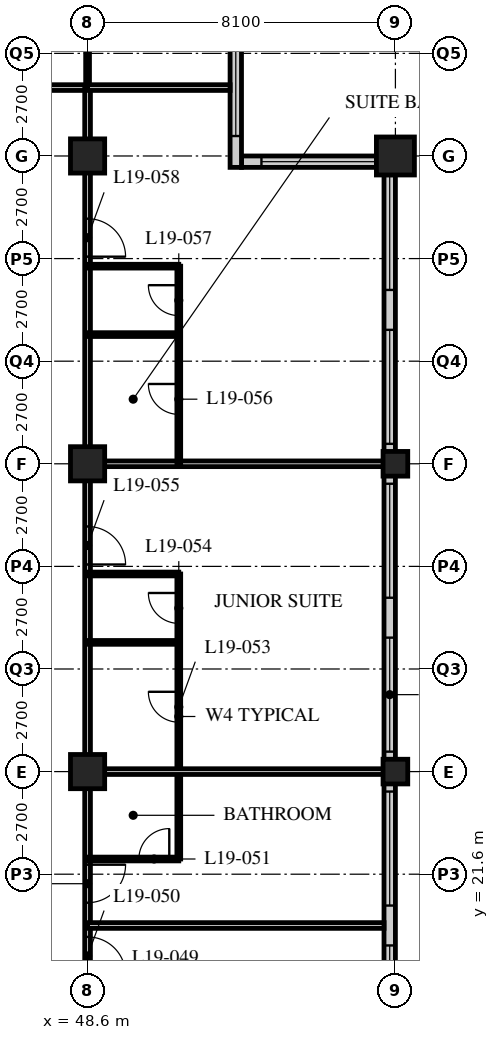
"""IFC4 building model, lengths in metres.
Left out: names, types, materials, properties, quantities, classifications, styles, units other than length and angle.
Written with IfcOpenShell. Run it as: python <this file> out.ifc"""

import sys

from ifc_helpers import new_model, si_unit, direction, frame, frame_2d, origin, origin_2d, place, context, subcontext, project, spatial, rectangle, hollow_rectangle, extrude, element, fill, save


model = new_model("IFC4")
c1 = context("Model", 3, precision=1e-05, world=origin(), true_north=direction((0.0, 1.0)))
c2 = subcontext(c1, "Body", "Model", "MODEL_VIEW")
j1 = project(units=[si_unit("LENGTHUNIT", "METRE"), si_unit("PLANEANGLEUNIT", "RADIAN")], contexts=[c1])
p1 = place(None, origin())
s1 = spatial("IfcSite", under=j1, at=p1, CompositionType="ELEMENT")
p2 = place(p1, origin())
s2 = spatial("IfcBuilding", under=s1, at=p2, CompositionType="ELEMENT")
p3 = place(p2, frame((0.0, 0.0, 77.2)))
s3 = spatial("IfcBuildingStorey", under=s2, at=p3, CompositionType="ELEMENT", Elevation=77.2)
for number, where, z_axis, x_axis in (
    (1, (48.6, 24.3, 0.0), (0.0, 0.0, 1.0), (1.0, 0.0, 0.0)),
    (2, (48.6, 32.4, 0.0), (0.0, 0.0, 1.0), (1.0, 0.0, 0.0)),
    (3, (48.6, 40.5, 0.0), (0.0, 0.0, 1.0), (1.0, 0.0, 0.0)),
):
    element("IfcColumn", number, at=place(p3, frame(where, z_axis=z_axis, x_axis=x_axis)), inside=s3, PredefinedType="COLUMN", context=c2, shape_type="SweptSolid", body=[
        extrude(hollow_rectangle(XDim=0.9, YDim=0.9, WallThickness=0.09, at=origin_2d()), origin(), (0.0, 0.0, 1.0), 3.4),
    ])
for number, where, z_axis, x_axis in (
    (4, (56.7, 24.3, 0.0), (0.0, 0.0, 1.0), (1.0, 0.0, 0.0)),
    (5, (56.7, 32.4, 0.0), (0.0, 0.0, 1.0), (1.0, 0.0, 0.0)),
):
    element("IfcColumn", number, at=place(p3, frame(where, z_axis=z_axis, x_axis=x_axis)), inside=s3, PredefinedType="COLUMN", context=c2, shape_type="SweptSolid", body=[
        extrude(hollow_rectangle(XDim=0.65, YDim=0.65, WallThickness=0.05, at=origin_2d()), origin(), (0.0, 0.0, 1.0), 3.4),
    ])
p4 = place(p3, frame((56.7, 40.5, 0.0), z_axis=(0.0, 0.0, 1.0), x_axis=(1.0, 0.0, 0.0)))
e6 = element("IfcColumn", 6, at=p4, inside=s3, PredefinedType="COLUMN", context=c2, shape_type="SweptSolid", body=[
    extrude(hollow_rectangle(XDim=1.0, YDim=1.0, WallThickness=0.1, at=origin_2d()), origin(), (0.0, 0.0, 1.0), 3.4),
])
p5 = place(p3, frame((56.55, 8.4, 0.0), z_axis=(0.0, 0.0, 1.0), x_axis=(0.0, 1.0, 0.0)))
e7 = element("IfcWall", 7, at=p5, inside=s3, PredefinedType="SOLIDWALL", context=c2, shape_type="SweptSolid", body=[
    extrude(rectangle(XDim=32.1, YDim=0.3, at=frame_2d((16.05, 0.0))), origin(), (0.0, 0.0, 1.0), 3.19),
])
p6 = place(p5, frame((0.225, 0.0, 0.9)))
e8 = element("IfcOpeningElement", 8, at=p6, cuts=e7, PredefinedType="OPENING", context=c2, shape_type="SweptSolid", body=[
    extrude(rectangle(XDim=3.0, YDim=1.5, at=frame_2d((1.5, 0.75))), frame((0.0, 0.16, 0.0), z_axis=(0.0, -1.0, 0.0), x_axis=(1.0, 0.0, 0.0)), (0.0, 0.0, 1.0), 0.32),
])
p7 = place(p5, frame((4.275, 0.0, 0.9)))
e9 = element("IfcOpeningElement", 9, at=p7, cuts=e7, PredefinedType="OPENING", context=c2, shape_type="SweptSolid", body=[
    extrude(rectangle(XDim=3.0, YDim=1.5, at=frame_2d((1.5, 0.75))), frame((0.0, 0.16, 0.0), z_axis=(0.0, -1.0, 0.0), x_axis=(1.0, 0.0, 0.0)), (0.0, 0.0, 1.0), 0.32),
])
p8 = place(p5, frame((8.325, 0.0, 0.9)))
e10 = element("IfcOpeningElement", 10, at=p8, cuts=e7, PredefinedType="OPENING", context=c2, shape_type="SweptSolid", body=[
    extrude(rectangle(XDim=3.0, YDim=1.5, at=frame_2d((1.5, 0.75))), frame((0.0, 0.16, 0.0), z_axis=(0.0, -1.0, 0.0), x_axis=(1.0, 0.0, 0.0)), (0.0, 0.0, 1.0), 0.32),
])
p9 = place(p5, frame((12.375, 0.0, 0.9)))
e11 = element("IfcOpeningElement", 11, at=p9, cuts=e7, PredefinedType="OPENING", context=c2, shape_type="SweptSolid", body=[
    extrude(rectangle(XDim=3.0, YDim=1.5, at=frame_2d((1.5, 0.75))), frame((0.0, 0.16, 0.0), z_axis=(0.0, -1.0, 0.0), x_axis=(1.0, 0.0, 0.0)), (0.0, 0.0, 1.0), 0.32),
])
p10 = place(p5, frame((16.425, 0.0, 0.9)))
e12 = element("IfcOpeningElement", 12, at=p10, cuts=e7, PredefinedType="OPENING", context=c2, shape_type="SweptSolid", body=[
    extrude(rectangle(XDim=3.0, YDim=1.5, at=frame_2d((1.5, 0.75))), frame((0.0, 0.16, 0.0), z_axis=(0.0, -1.0, 0.0), x_axis=(1.0, 0.0, 0.0)), (0.0, 0.0, 1.0), 0.32),
])
p11 = place(p5, frame((20.475, 0.0, 0.9)))
e13 = element("IfcOpeningElement", 13, at=p11, cuts=e7, PredefinedType="OPENING", context=c2, shape_type="SweptSolid", body=[
    extrude(rectangle(XDim=3.0, YDim=1.5, at=frame_2d((1.5, 0.75))), frame((0.0, 0.16, 0.0), z_axis=(0.0, -1.0, 0.0), x_axis=(1.0, 0.0, 0.0)), (0.0, 0.0, 1.0), 0.32),
])
p12 = place(p5, frame((24.525, 0.0, 0.9)))
e14 = element("IfcOpeningElement", 14, at=p12, cuts=e7, PredefinedType="OPENING", context=c2, shape_type="SweptSolid", body=[
    extrude(rectangle(XDim=3.0, YDim=1.5, at=frame_2d((1.5, 0.75))), frame((0.0, 0.16, 0.0), z_axis=(0.0, -1.0, 0.0), x_axis=(1.0, 0.0, 0.0)), (0.0, 0.0, 1.0), 0.32),
])
p13 = place(p5, frame((28.575, 0.0, 0.9)))
e15 = element("IfcOpeningElement", 15, at=p13, cuts=e7, PredefinedType="OPENING", context=c2, shape_type="SweptSolid", body=[
    extrude(rectangle(XDim=3.0, YDim=1.5, at=frame_2d((1.5, 0.75))), frame((0.0, 0.16, 0.0), z_axis=(0.0, -1.0, 0.0), x_axis=(1.0, 0.0, 0.0)), (0.0, 0.0, 1.0), 0.32),
])
p14 = place(p3, frame((56.4, 40.35, 0.0), z_axis=(0.0, 0.0, 1.0), x_axis=(-1.0, 0.0, 0.0)))
e16 = element("IfcWall", 16, at=p14, inside=s3, PredefinedType="SOLIDWALL", context=c2, shape_type="SweptSolid", body=[
    extrude(rectangle(XDim=3.75, YDim=0.3, at=frame_2d((1.875, 0.0))), origin(), (0.0, 0.0, 1.0), 3.19),
])
p15 = place(p14, frame((0.225, 0.0, 0.9)))
e17 = element("IfcOpeningElement", 17, at=p15, cuts=e16, PredefinedType="OPENING", context=c2, shape_type="SweptSolid", body=[
    extrude(rectangle(XDim=3.0, YDim=1.5, at=frame_2d((1.5, 0.75))), frame((0.0, 0.16, 0.0), z_axis=(0.0, -1.0, 0.0), x_axis=(1.0, 0.0, 0.0)), (0.0, 0.0, 1.0), 0.32),
])
p16 = place(p3, frame((52.5, 40.2, 0.0), z_axis=(0.0, 0.0, 1.0), x_axis=(0.0, 1.0, 0.0)))
e18 = element("IfcWall", 18, at=p16, inside=s3, PredefinedType="SOLIDWALL", context=c2, shape_type="SweptSolid", body=[
    extrude(rectangle(XDim=4.35, YDim=0.3, at=frame_2d((2.175, 0.0))), origin(), (0.0, 0.0, 1.0), 3.19),
])
p17 = place(p16, frame((0.825, 0.0, 0.9)))
e19 = element("IfcOpeningElement", 19, at=p17, cuts=e18, PredefinedType="OPENING", context=c2, shape_type="SweptSolid", body=[
    extrude(rectangle(XDim=3.0, YDim=1.5, at=frame_2d((1.5, 0.75))), frame((0.0, 0.16, 0.0), z_axis=(0.0, -1.0, 0.0), x_axis=(1.0, 0.0, 0.0)), (0.0, 0.0, 1.0), 0.32),
])
p18 = place(p3, frame((12.15, 42.3, 0.0), z_axis=(0.0, 0.0, 1.0), x_axis=(1.0, 0.0, 0.0)))
e20 = element("IfcWall", 20, at=p18, inside=s3, PredefinedType="PARTITIONING", context=c2, shape_type="SweptSolid", body=[
    extrude(rectangle(XDim=36.45, YDim=0.15, at=frame_2d((18.225, 0.0))), origin(), (0.0, 0.0, 1.0), 3.19),
])
p19 = place(p18, frame((9.5, 0.0, 0.0)))
e21 = element("IfcOpeningElement", 21, at=p19, cuts=e20, PredefinedType="OPENING", context=c2, shape_type="SweptSolid", body=[
    extrude(rectangle(XDim=1.0, YDim=2.1, at=frame_2d((0.5, 1.05))), frame((0.0, 0.085, 0.0), z_axis=(0.0, -1.0, 0.0), x_axis=(1.0, 0.0, 0.0)), (0.0, 0.0, 1.0), 0.17),
])
p20 = place(p18, frame((17.6, 0.0, 0.0)))
e22 = element("IfcOpeningElement", 22, at=p20, cuts=e20, PredefinedType="OPENING", context=c2, shape_type="SweptSolid", body=[
    extrude(rectangle(XDim=1.0, YDim=2.1, at=frame_2d((0.5, 1.05))), frame((0.0, 0.085, 0.0), z_axis=(0.0, -1.0, 0.0), x_axis=(1.0, 0.0, 0.0)), (0.0, 0.0, 1.0), 0.17),
])
p21 = place(p18, frame((22.7, 0.0, 0.0)))
e23 = element("IfcOpeningElement", 23, at=p21, cuts=e20, PredefinedType="OPENING", context=c2, shape_type="SweptSolid", body=[
    extrude(rectangle(XDim=1.0, YDim=2.1, at=frame_2d((0.5, 1.05))), frame((0.0, 0.085, 0.0), z_axis=(0.0, -1.0, 0.0), x_axis=(1.0, 0.0, 0.0)), (0.0, 0.0, 1.0), 0.17),
])
p22 = place(p18, frame((26.75, 0.0, 0.0)))
e24 = element("IfcOpeningElement", 24, at=p22, cuts=e20, PredefinedType="OPENING", context=c2, shape_type="SweptSolid", body=[
    extrude(rectangle(XDim=1.0, YDim=2.1, at=frame_2d((0.5, 1.05))), frame((0.0, 0.085, 0.0), z_axis=(0.0, -1.0, 0.0), x_axis=(1.0, 0.0, 0.0)), (0.0, 0.0, 1.0), 0.17),
])
p23 = place(p18, frame((30.8, 0.0, 0.0)))
e25 = element("IfcOpeningElement", 25, at=p23, cuts=e20, PredefinedType="OPENING", context=c2, shape_type="SweptSolid", body=[
    extrude(rectangle(XDim=1.0, YDim=2.1, at=frame_2d((0.5, 1.05))), frame((0.0, 0.085, 0.0), z_axis=(0.0, -1.0, 0.0), x_axis=(1.0, 0.0, 0.0)), (0.0, 0.0, 1.0), 0.17),
])
p24 = place(p18, frame((32.825, 0.0, 0.0)))
e26 = element("IfcOpeningElement", 26, at=p24, cuts=e20, PredefinedType="OPENING", context=c2, shape_type="SweptSolid", body=[
    extrude(rectangle(XDim=1.0, YDim=2.1, at=frame_2d((0.5, 1.05))), frame((0.0, 0.085, 0.0), z_axis=(0.0, -1.0, 0.0), x_axis=(1.0, 0.0, 0.0)), (0.0, 0.0, 1.0), 0.17),
])
p25 = place(p18, frame((2.625, 0.0, 0.0)))
e27 = element("IfcOpeningElement", 27, at=p25, cuts=e20, PredefinedType="OPENING", context=c2, shape_type="SweptSolid", body=[
    extrude(rectangle(XDim=1.0, YDim=2.1, at=frame_2d((0.5, 1.05))), frame((0.0, 0.085, 0.0), z_axis=(0.0, -1.0, 0.0), x_axis=(1.0, 0.0, 0.0)), (0.0, 0.0, 1.0), 0.17),
])
p26 = place(p3, frame((48.6, 16.2, 0.0), z_axis=(0.0, 0.0, 1.0), x_axis=(0.0, 1.0, 0.0)))
e28 = element("IfcWall", 28, at=p26, inside=s3, PredefinedType="PARTITIONING", context=c2, shape_type="SweptSolid", body=[
    extrude(rectangle(XDim=26.1, YDim=0.15, at=frame_2d((13.05, 0.0))), origin(), (0.0, 0.0, 1.0), 2.428),
])
p27 = place(p26, frame((2.75, 0.0, 0.0)))
e29 = element("IfcOpeningElement", 29, at=p27, cuts=e28, PredefinedType="OPENING", context=c2, shape_type="SweptSolid", body=[
    extrude(rectangle(XDim=1.0, YDim=2.1, at=frame_2d((0.5, 1.05))), frame((0.0, 0.085, 0.0), z_axis=(0.0, -1.0, 0.0), x_axis=(1.0, 0.0, 0.0)), (0.0, 0.0, 1.0), 0.17),
])
p28 = place(p26, frame((4.65, 0.0, 0.0)))
e30 = element("IfcOpeningElement", 30, at=p28, cuts=e28, PredefinedType="OPENING", context=c2, shape_type="SweptSolid", body=[
    extrude(rectangle(XDim=1.0, YDim=2.1, at=frame_2d((0.5, 1.05))), frame((0.0, 0.085, 0.0), z_axis=(0.0, -1.0, 0.0), x_axis=(1.0, 0.0, 0.0)), (0.0, 0.0, 1.0), 0.17),
])
p29 = place(p26, frame((13.55, 0.0, 0.0)))
e31 = element("IfcOpeningElement", 31, at=p29, cuts=e28, PredefinedType="OPENING", context=c2, shape_type="SweptSolid", body=[
    extrude(rectangle(XDim=1.0, YDim=2.1, at=frame_2d((0.5, 1.05))), frame((0.0, 0.085, 0.0), z_axis=(0.0, -1.0, 0.0), x_axis=(1.0, 0.0, 0.0)), (0.0, 0.0, 1.0), 0.17),
])
p30 = place(p26, frame((21.65, 0.0, 0.0)))
e32 = element("IfcOpeningElement", 32, at=p30, cuts=e28, PredefinedType="OPENING", context=c2, shape_type="SweptSolid", body=[
    extrude(rectangle(XDim=1.0, YDim=2.1, at=frame_2d((0.5, 1.05))), frame((0.0, 0.085, 0.0), z_axis=(0.0, -1.0, 0.0), x_axis=(1.0, 0.0, 0.0)), (0.0, 0.0, 1.0), 0.17),
])
p31 = place(p3, frame((48.6, 20.25, 0.0), z_axis=(0.0, 0.0, 1.0), x_axis=(1.0, 0.0, 0.0)))
e33 = element("IfcWall", 33, at=p31, inside=s3, PredefinedType="PARTITIONING", context=c2, shape_type="SweptSolid", body=[
    extrude(rectangle(XDim=7.8, YDim=0.15, at=frame_2d((3.9, 0.0))), origin(), (0.0, 0.0, 1.0), 3.19),
])
p32 = place(p3, frame((51.0, 22.0, 0.0), z_axis=(0.0, 0.0, 1.0), x_axis=(0.0, 1.0, 0.0)))
e34 = element("IfcWall", 34, at=p32, inside=s3, PredefinedType="PARTITIONING", context=c2, shape_type="SweptSolid", body=[
    extrude(rectangle(XDim=7.5, YDim=0.1, at=frame_2d((3.75, 0.0))), origin(), (0.0, 0.0, 1.0), 3.19),
])
p33 = place(p32, frame((3.6, 0.0, 0.0)))
e35 = element("IfcOpeningElement", 35, at=p33, cuts=e34, PredefinedType="OPENING", context=c2, shape_type="SweptSolid", body=[
    extrude(rectangle(XDim=0.8, YDim=2.1, at=frame_2d((0.4, 1.05))), frame((0.0, 0.06, 0.0), z_axis=(0.0, -1.0, 0.0), x_axis=(1.0, 0.0, 0.0)), (0.0, 0.0, 1.0), 0.12),
])
p34 = place(p32, frame((6.2, 0.0, 0.0)))
e36 = element("IfcOpeningElement", 36, at=p34, cuts=e34, PredefinedType="OPENING", context=c2, shape_type="SweptSolid", body=[
    extrude(rectangle(XDim=0.8, YDim=2.1, at=frame_2d((0.4, 1.05))), frame((0.0, 0.06, 0.0), z_axis=(0.0, -1.0, 0.0), x_axis=(1.0, 0.0, 0.0)), (0.0, 0.0, 1.0), 0.12),
])
p35 = place(p3, frame((48.6, 22.0, 0.0), z_axis=(0.0, 0.0, 1.0), x_axis=(1.0, 0.0, 0.0)))
e37 = element("IfcWall", 37, at=p35, inside=s3, PredefinedType="PARTITIONING", context=c2, shape_type="SweptSolid", body=[
    extrude(rectangle(XDim=2.4, YDim=0.1, at=frame_2d((1.2, 0.0))), origin(), (0.0, 0.0, 1.0), 3.19),
])
p36 = place(p35, frame((1.35, 0.0, 0.0)))
e38 = element("IfcOpeningElement", 38, at=p36, cuts=e37, PredefinedType="OPENING", context=c2, shape_type="SweptSolid", body=[
    extrude(rectangle(XDim=0.8, YDim=2.1, at=frame_2d((0.4, 1.05))), frame((0.0, 0.06, 0.0), z_axis=(0.0, -1.0, 0.0), x_axis=(1.0, 0.0, 0.0)), (0.0, 0.0, 1.0), 0.12),
])
p37 = place(p3, frame((48.6, 24.3, 0.0), z_axis=(0.0, 0.0, 1.0), x_axis=(1.0, 0.0, 0.0)))
e39 = element("IfcWall", 39, at=p37, inside=s3, PredefinedType="PARTITIONING", context=c2, shape_type="SweptSolid", body=[
    extrude(rectangle(XDim=7.8, YDim=0.15, at=frame_2d((3.9, 0.0))), origin(), (0.0, 0.0, 1.0), 2.428),
])
for number, where, z_axis, x_axis in (
    (40, (48.6, 27.7, 0.0), (0.0, 0.0, 1.0), (1.0, 0.0, 0.0)),
    (41, (48.6, 29.5, 0.0), (0.0, 0.0, 1.0), (1.0, 0.0, 0.0)),
):
    element("IfcWall", number, at=place(p3, frame(where, z_axis=z_axis, x_axis=x_axis)), inside=s3, PredefinedType="PARTITIONING", context=c2, shape_type="SweptSolid", body=[
        extrude(rectangle(XDim=2.4, YDim=0.1, at=frame_2d((1.2, 0.0))), origin(), (0.0, 0.0, 1.0), 3.19),
    ])
p38 = place(p3, frame((48.6, 32.4, 0.0), z_axis=(0.0, 0.0, 1.0), x_axis=(1.0, 0.0, 0.0)))
e42 = element("IfcWall", 42, at=p38, inside=s3, PredefinedType="PARTITIONING", context=c2, shape_type="SweptSolid", body=[
    extrude(rectangle(XDim=7.8, YDim=0.15, at=frame_2d((3.9, 0.0))), origin(), (0.0, 0.0, 1.0), 2.428),
])
p39 = place(p3, frame((51.0, 32.4, 0.0), z_axis=(0.0, 0.0, 1.0), x_axis=(0.0, 1.0, 0.0)))
e43 = element("IfcWall", 43, at=p39, inside=s3, PredefinedType="PARTITIONING", context=c2, shape_type="SweptSolid", body=[
    extrude(rectangle(XDim=5.2, YDim=0.1, at=frame_2d((2.6, 0.0))), origin(), (0.0, 0.0, 1.0), 3.19),
])
p40 = place(p39, frame((1.3, 0.0, 0.0)))
e44 = element("IfcOpeningElement", 44, at=p40, cuts=e43, PredefinedType="OPENING", context=c2, shape_type="SweptSolid", body=[
    extrude(rectangle(XDim=0.8, YDim=2.1, at=frame_2d((0.4, 1.05))), frame((0.0, 0.06, 0.0), z_axis=(0.0, -1.0, 0.0), x_axis=(1.0, 0.0, 0.0)), (0.0, 0.0, 1.0), 0.12),
])
p41 = place(p39, frame((3.9, 0.0, 0.0)))
e45 = element("IfcOpeningElement", 45, at=p41, cuts=e43, PredefinedType="OPENING", context=c2, shape_type="SweptSolid", body=[
    extrude(rectangle(XDim=0.8, YDim=2.1, at=frame_2d((0.4, 1.05))), frame((0.0, 0.06, 0.0), z_axis=(0.0, -1.0, 0.0), x_axis=(1.0, 0.0, 0.0)), (0.0, 0.0, 1.0), 0.12),
])
for number, where, z_axis, x_axis in (
    (46, (48.6, 35.8, 0.0), (0.0, 0.0, 1.0), (1.0, 0.0, 0.0)),
    (47, (48.6, 37.6, 0.0), (0.0, 0.0, 1.0), (1.0, 0.0, 0.0)),
):
    element("IfcWall", number, at=place(p3, frame(where, z_axis=z_axis, x_axis=x_axis)), inside=s3, PredefinedType="PARTITIONING", context=c2, shape_type="SweptSolid", body=[
        extrude(rectangle(XDim=2.4, YDim=0.1, at=frame_2d((1.2, 0.0))), origin(), (0.0, 0.0, 1.0), 3.19),
    ])
p42 = place(p3, frame((48.6, 42.3, 0.0), z_axis=(0.0, 0.0, 1.0), x_axis=(0.0, 1.0, 0.0)))
e48 = element("IfcWall", 48, at=p42, inside=s3, PredefinedType="PARTITIONING", context=c2, shape_type="SweptSolid", body=[
    extrude(rectangle(XDim=1.95, YDim=0.1, at=frame_2d((0.975, 0.0))), origin(), (0.0, 0.0, 1.0), 2.428),
])
p43 = place(p3, frame((48.6, 42.3, 0.0), z_axis=(0.0, 0.0, 1.0), x_axis=(1.0, 0.0, 0.0)))
e49 = element("IfcWall", 49, at=p43, inside=s3, PredefinedType="PARTITIONING", context=c2, shape_type="SweptSolid", body=[
    extrude(rectangle(XDim=3.75, YDim=0.15, at=frame_2d((1.875, 0.0))), origin(), (0.0, 0.0, 1.0), 3.19),
])
p44 = place(p8, origin())
e50 = element("IfcWindow", 50, at=p44, inside=s3, PartitioningType="SINGLE_PANEL", PredefinedType="WINDOW", context=c2, shape_type="SweptSolid", body=[
    extrude(rectangle(XDim=3.0, YDim=1.5, at=frame_2d((1.5, 0.75))), frame((0.0, 0.03, 0.0), z_axis=(0.0, -1.0, 0.0), x_axis=(1.0, 0.0, 0.0)), (0.0, 0.0, 1.0), 0.06),
])
fill(e10, e50)
p45 = place(p9, origin())
e51 = element("IfcWindow", 51, at=p45, inside=s3, PartitioningType="SINGLE_PANEL", PredefinedType="WINDOW", context=c2, shape_type="SweptSolid", body=[
    extrude(rectangle(XDim=3.0, YDim=1.5, at=frame_2d((1.5, 0.75))), frame((0.0, 0.03, 0.0), z_axis=(0.0, -1.0, 0.0), x_axis=(1.0, 0.0, 0.0)), (0.0, 0.0, 1.0), 0.06),
])
fill(e11, e51)
p46 = place(p10, origin())
e52 = element("IfcWindow", 52, at=p46, inside=s3, PartitioningType="SINGLE_PANEL", PredefinedType="WINDOW", context=c2, shape_type="SweptSolid", body=[
    extrude(rectangle(XDim=3.0, YDim=1.5, at=frame_2d((1.5, 0.75))), frame((0.0, 0.03, 0.0), z_axis=(0.0, -1.0, 0.0), x_axis=(1.0, 0.0, 0.0)), (0.0, 0.0, 1.0), 0.06),
])
fill(e12, e52)
p47 = place(p11, origin())
e53 = element("IfcWindow", 53, at=p47, inside=s3, PartitioningType="SINGLE_PANEL", PredefinedType="WINDOW", context=c2, shape_type="SweptSolid", body=[
    extrude(rectangle(XDim=3.0, YDim=1.5, at=frame_2d((1.5, 0.75))), frame((0.0, 0.03, 0.0), z_axis=(0.0, -1.0, 0.0), x_axis=(1.0, 0.0, 0.0)), (0.0, 0.0, 1.0), 0.06),
])
fill(e13, e53)
p48 = place(p12, origin())
e54 = element("IfcWindow", 54, at=p48, inside=s3, PartitioningType="SINGLE_PANEL", PredefinedType="WINDOW", context=c2, shape_type="SweptSolid", body=[
    extrude(rectangle(XDim=3.0, YDim=1.5, at=frame_2d((1.5, 0.75))), frame((0.0, 0.03, 0.0), z_axis=(0.0, -1.0, 0.0), x_axis=(1.0, 0.0, 0.0)), (0.0, 0.0, 1.0), 0.06),
])
fill(e14, e54)
p49 = place(p13, origin())
e55 = element("IfcWindow", 55, at=p49, inside=s3, PartitioningType="SINGLE_PANEL", PredefinedType="WINDOW", context=c2, shape_type="SweptSolid", body=[
    extrude(rectangle(XDim=3.0, YDim=1.5, at=frame_2d((1.5, 0.75))), frame((0.0, 0.03, 0.0), z_axis=(0.0, -1.0, 0.0), x_axis=(1.0, 0.0, 0.0)), (0.0, 0.0, 1.0), 0.06),
])
fill(e15, e55)
p50 = place(p15, origin())
e56 = element("IfcWindow", 56, at=p50, inside=s3, PartitioningType="SINGLE_PANEL", PredefinedType="WINDOW", context=c2, shape_type="SweptSolid", body=[
    extrude(rectangle(XDim=3.0, YDim=1.5, at=frame_2d((1.5, 0.75))), frame((0.0, 0.03, 0.0), z_axis=(0.0, -1.0, 0.0), x_axis=(1.0, 0.0, 0.0)), (0.0, 0.0, 1.0), 0.06),
])
fill(e17, e56)
p51 = place(p17, origin())
e57 = element("IfcWindow", 57, at=p51, inside=s3, PartitioningType="SINGLE_PANEL", PredefinedType="WINDOW", context=c2, shape_type="SweptSolid", body=[
    extrude(rectangle(XDim=3.0, YDim=1.5, at=frame_2d((1.5, 0.75))), frame((0.0, 0.03, 0.0), z_axis=(0.0, -1.0, 0.0), x_axis=(1.0, 0.0, 0.0)), (0.0, 0.0, 1.0), 0.06),
])
fill(e19, e57)
p52 = place(p27, origin())
e58 = element("IfcDoor", 58, at=p52, inside=s3, OperationType="SINGLE_SWING_RIGHT", PredefinedType="DOOR", context=c2, shape_type="SweptSolid", body=[
    extrude(rectangle(XDim=1.0, YDim=2.1, at=frame_2d((0.5, 1.05))), frame((0.0, 0.025, 0.0), z_axis=(0.0, -1.0, 0.0), x_axis=(1.0, 0.0, 0.0)), (0.0, 0.0, 1.0), 0.05),
])
fill(e29, e58)
p53 = place(p36, origin())
e59 = element("IfcDoor", 59, at=p53, inside=s3, OperationType="SINGLE_SWING_RIGHT", PredefinedType="DOOR", context=c2, shape_type="SweptSolid", body=[
    extrude(rectangle(XDim=0.8, YDim=2.1, at=frame_2d((0.4, 1.05))), frame((0.0, 0.025, 0.0), z_axis=(0.0, -1.0, 0.0), x_axis=(1.0, 0.0, 0.0)), (0.0, 0.0, 1.0), 0.05),
])
fill(e38, e59)
p54 = place(p28, origin())
e60 = element("IfcDoor", 60, at=p54, inside=s3, OperationType="SINGLE_SWING_LEFT", PredefinedType="DOOR", context=c2, shape_type="SweptSolid", body=[
    extrude(rectangle(XDim=1.0, YDim=2.1, at=frame_2d((0.5, 1.05))), frame((0.0, 0.025, 0.0), z_axis=(0.0, -1.0, 0.0), x_axis=(1.0, 0.0, 0.0)), (0.0, 0.0, 1.0), 0.05),
])
fill(e30, e60)
p55 = place(p33, origin())
e61 = element("IfcDoor", 61, at=p55, inside=s3, OperationType="SINGLE_SWING_RIGHT", PredefinedType="DOOR", context=c2, shape_type="SweptSolid", body=[
    extrude(rectangle(XDim=0.8, YDim=2.1, at=frame_2d((0.4, 1.05))), frame((0.0, 0.025, 0.0), z_axis=(0.0, -1.0, 0.0), x_axis=(1.0, 0.0, 0.0)), (0.0, 0.0, 1.0), 0.05),
])
fill(e35, e61)
p56 = place(p34, origin())
e62 = element("IfcDoor", 62, at=p56, inside=s3, OperationType="SINGLE_SWING_RIGHT", PredefinedType="DOOR", context=c2, shape_type="SweptSolid", body=[
    extrude(rectangle(XDim=0.8, YDim=2.1, at=frame_2d((0.4, 1.05))), frame((0.0, 0.025, 0.0), z_axis=(0.0, -1.0, 0.0), x_axis=(1.0, 0.0, 0.0)), (0.0, 0.0, 1.0), 0.05),
])
fill(e36, e62)
p57 = place(p29, origin())
e63 = element("IfcDoor", 63, at=p57, inside=s3, OperationType="SINGLE_SWING_RIGHT", PredefinedType="DOOR", context=c2, shape_type="SweptSolid", body=[
    extrude(rectangle(XDim=1.0, YDim=2.1, at=frame_2d((0.5, 1.05))), frame((0.0, 0.025, 0.0), z_axis=(0.0, -1.0, 0.0), x_axis=(1.0, 0.0, 0.0)), (0.0, 0.0, 1.0), 0.05),
])
fill(e31, e63)
p58 = place(p40, origin())
e64 = element("IfcDoor", 64, at=p58, inside=s3, OperationType="SINGLE_SWING_RIGHT", PredefinedType="DOOR", context=c2, shape_type="SweptSolid", body=[
    extrude(rectangle(XDim=0.8, YDim=2.1, at=frame_2d((0.4, 1.05))), frame((0.0, 0.025, 0.0), z_axis=(0.0, -1.0, 0.0), x_axis=(1.0, 0.0, 0.0)), (0.0, 0.0, 1.0), 0.05),
])
fill(e44, e64)
p59 = place(p41, origin())
e65 = element("IfcDoor", 65, at=p59, inside=s3, OperationType="SINGLE_SWING_RIGHT", PredefinedType="DOOR", context=c2, shape_type="SweptSolid", body=[
    extrude(rectangle(XDim=0.8, YDim=2.1, at=frame_2d((0.4, 1.05))), frame((0.0, 0.025, 0.0), z_axis=(0.0, -1.0, 0.0), x_axis=(1.0, 0.0, 0.0)), (0.0, 0.0, 1.0), 0.05),
])
fill(e45, e65)
p60 = place(p30, origin())
e66 = element("IfcDoor", 66, at=p60, inside=s3, OperationType="SINGLE_SWING_RIGHT", PredefinedType="DOOR", context=c2, shape_type="SweptSolid", body=[
    extrude(rectangle(XDim=1.0, YDim=2.1, at=frame_2d((0.5, 1.05))), frame((0.0, 0.025, 0.0), z_axis=(0.0, -1.0, 0.0), x_axis=(1.0, 0.0, 0.0)), (0.0, 0.0, 1.0), 0.05),
])
fill(e32, e66)
save(model, sys.argv[1])
